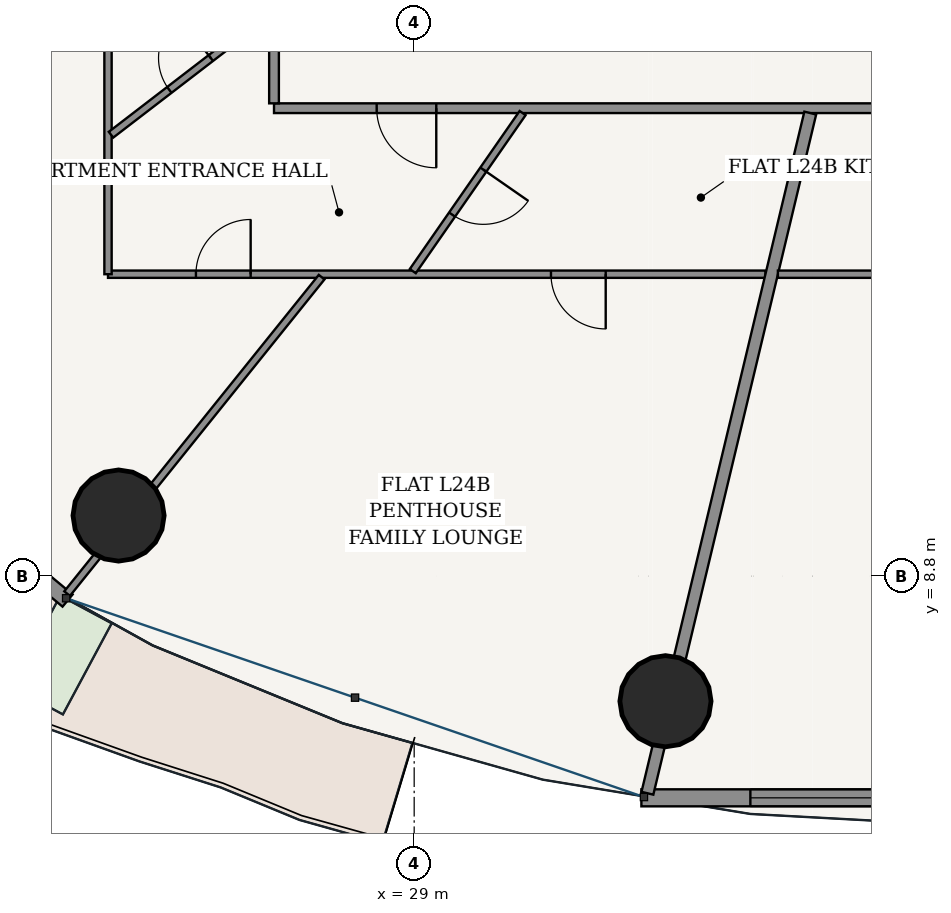
"""IFC4 building model, lengths in metres.
Left out: names, types, materials, properties, quantities, classifications, styles, units other than length and angle.
Written with IfcOpenShell. Run it as: python <this file> out.ifc"""

import sys

from ifc_helpers import new_model, si_unit, direction, frame, frame_2d, origin, origin_2d, place, context, subcontext, project, spatial, rectangle, hollow_circle, extrude, source, transform, mapped, element, fill, save


model = new_model("IFC4")
c1 = context("Model", 3, precision=1e-05, world=origin(), true_north=direction((-0.2419218956, 0.970295726276)))
c2 = subcontext(c1, "Body", "Model", "MODEL_VIEW")
j1 = project(units=[si_unit("LENGTHUNIT", "METRE"), si_unit("PLANEANGLEUNIT", "RADIAN")], contexts=[c1])
p1 = place(None, origin())
s1 = spatial("IfcSite", under=j1, at=p1, CompositionType="ELEMENT")
p2 = place(p1, origin())
s2 = spatial("IfcBuilding", under=s1, at=p2, CompositionType="ELEMENT")
p3 = place(p2, frame((0.0, 0.0, 94.2)))
s3 = spatial("IfcBuildingStorey", under=s2, at=p3, CompositionType="ELEMENT", Elevation=94.2)
for number, where, z_axis, x_axis in (
    (1, (24.138, 9.796, 0.0), (0.0, 0.0, 1.0), (1.0, 0.0, 0.0)),
    (2, (33.133, 6.743, 0.0), (0.0, 0.0, 1.0), (1.0, 0.0, 0.0)),
):
    element("IfcColumn", number, at=place(p3, frame(where, z_axis=z_axis, x_axis=x_axis)), inside=s3, PredefinedType="COLUMN", context=c2, shape_type="SweptSolid", body=[
        extrude(hollow_circle(Radius=0.75, WallThickness=0.045, at=origin_2d()), origin(), (0.0, 0.0, 1.0), 3.6),
    ])
p4 = place(p3, frame((15.846, 14.59, 0.0), z_axis=(0.0, 0.0, 1.0), x_axis=(0.769254958887, -0.638941944333, 0.0)))
e3 = element("IfcWall", 3, at=p4, inside=s3, PredefinedType="SOLIDWALL", context=c2, shape_type="SweptSolid", body=[
    extrude(rectangle(XDim=9.69, YDim=0.26, at=frame_2d((4.845, 0.0))), origin(), (0.0, 0.0, 1.0), 3.325),
])
p5 = place(p4, frame((4.17, 0.0, 0.0)))
e4 = element("IfcOpeningElement", 4, at=p5, cuts=e3, PredefinedType="OPENING", context=c2, shape_type="SweptSolid", body=[
    extrude(rectangle(XDim=1.35, YDim=2.2, at=frame_2d((0.675, 1.1))), frame((0.0, 0.14, 0.0), z_axis=(0.0, -1.0, 0.0), x_axis=(1.0, 0.0, 0.0)), (0.0, 0.0, 1.0), 0.28),
])
p6 = place(p3, frame((32.736, 5.154, 0.0), z_axis=(0.0, 0.0, 1.0), x_axis=(1.0, 0.0, 0.0)))
e5 = element("IfcWall", 5, at=p6, inside=s3, PredefinedType="SOLIDWALL", context=c2, shape_type="SweptSolid", body=[
    extrude(rectangle(XDim=10.527, YDim=0.28, at=frame_2d((5.264, 0.0))), origin(), (0.0, 0.0, 1.0), 3.325),
])
p7 = place(p6, frame((1.792, 0.0, 0.85)))
e6 = element("IfcOpeningElement", 6, at=p7, cuts=e5, PredefinedType="OPENING", context=c2, shape_type="SweptSolid", body=[
    extrude(rectangle(XDim=2.1, YDim=1.95, at=frame_2d((1.05, 0.975))), frame((0.0, 0.15, 0.0), z_axis=(0.0, -1.0, 0.0), x_axis=(1.0, 0.0, 0.0)), (0.0, 0.0, 1.0), 0.3),
])
p8 = place(p6, frame((6.635, 0.0, 0.85)))
e7 = element("IfcOpeningElement", 7, at=p8, cuts=e5, PredefinedType="OPENING", context=c2, shape_type="SweptSolid", body=[
    extrude(rectangle(XDim=2.1, YDim=1.95, at=frame_2d((1.05, 0.975))), frame((0.0, 0.15, 0.0), z_axis=(0.0, -1.0, 0.0), x_axis=(1.0, 0.0, 0.0)), (0.0, 0.0, 1.0), 0.3),
])
p9 = place(p3, frame((26.695, 16.495, 0.0), z_axis=(0.0, 0.0, 1.0), x_axis=(1.0, 0.0, 0.0)))
e8 = element("IfcWall", 8, at=p9, inside=s3, PredefinedType="PARTITIONING", context=c2, shape_type="SweptSolid", body=[
    extrude(rectangle(XDim=22.61, YDim=0.16, at=frame_2d((11.305, 0.0))), origin(), (0.0, 0.0, 1.0), 2.767),
])
p10 = place(p9, frame((1.688, 0.0, 0.0)))
e9 = element("IfcOpeningElement", 9, at=p10, cuts=e8, PredefinedType="OPENING", context=c2, shape_type="SweptSolid", body=[
    extrude(rectangle(XDim=0.98, YDim=2.2, at=frame_2d((0.49, 1.1))), frame((0.0, 0.09, 0.0), z_axis=(0.0, -1.0, 0.0), x_axis=(1.0, 0.0, 0.0)), (0.0, 0.0, 1.0), 0.18),
])
p11 = place(p9, frame((16.137, 0.0, 0.0)))
e10 = element("IfcOpeningElement", 10, at=p11, cuts=e8, PredefinedType="OPENING", context=c2, shape_type="SweptSolid", body=[
    extrude(rectangle(XDim=0.98, YDim=2.2, at=frame_2d((0.49, 1.1))), frame((0.0, 0.09, 0.0), z_axis=(0.0, -1.0, 0.0), x_axis=(1.0, 0.0, 0.0)), (0.0, 0.0, 1.0), 0.18),
])
p12 = place(p3, frame((26.695, 16.575, 0.0), z_axis=(0.0, 0.0, 1.0), x_axis=(0.0, 1.0, 0.0)))
e11 = element("IfcWall", 11, at=p12, inside=s3, PredefinedType="PARTITIONING", context=c2, shape_type="SweptSolid", body=[
    extrude(rectangle(XDim=20.45, YDim=0.16, at=frame_2d((10.225, 0.0))), origin(), (0.0, 0.0, 1.0), 2.767),
])
p13 = place(p3, frame((34.777, 13.765, 0.0), z_axis=(0.0, 0.0, 1.0), x_axis=(-1.0, 0.0, 0.0)))
e12 = element("IfcWall", 12, at=p13, inside=s3, PredefinedType="PARTITIONING", context=c2, shape_type="SweptSolid", body=[
    extrude(rectangle(XDim=10.812, YDim=0.12, at=frame_2d((5.406, 0.0))), origin(), (0.0, 0.0, 1.0), 2.767),
])
p14 = place(p13, frame((8.466, 0.0, 0.0)))
e13 = element("IfcOpeningElement", 13, at=p14, cuts=e12, PredefinedType="OPENING", context=c2, shape_type="SweptSolid", body=[
    extrude(rectangle(XDim=0.9, YDim=2.15, at=frame_2d((0.45, 1.075))), frame((0.0, 0.07, 0.0), z_axis=(0.0, -1.0, 0.0), x_axis=(1.0, 0.0, 0.0)), (0.0, 0.0, 1.0), 0.14),
])
p15 = place(p13, frame((2.628, 0.0, 0.0)))
e14 = element("IfcOpeningElement", 14, at=p15, cuts=e12, PredefinedType="OPENING", context=c2, shape_type="SweptSolid", body=[
    extrude(rectangle(XDim=0.9, YDim=2.15, at=frame_2d((0.45, 1.075))), frame((0.0, 0.07, 0.0), z_axis=(0.0, -1.0, 0.0), x_axis=(1.0, 0.0, 0.0)), (0.0, 0.0, 1.0), 0.14),
])
p16 = place(p3, frame((23.965, 13.765, 0.0), z_axis=(0.0, 0.0, 1.0), x_axis=(0.0, 1.0, 0.0)))
e15 = element("IfcWall", 15, at=p16, inside=s3, PredefinedType="PARTITIONING", context=c2, shape_type="SweptSolid", body=[
    extrude(rectangle(XDim=20.725, YDim=0.12, at=frame_2d((10.362, 0.0))), origin(), (0.0, 0.0, 1.0), 2.767),
])
p17 = place(p16, frame((9.401, 0.0, 0.0)))
e16 = element("IfcOpeningElement", 16, at=p17, cuts=e15, PredefinedType="OPENING", context=c2, shape_type="SweptSolid", body=[
    extrude(rectangle(XDim=0.9, YDim=2.15, at=frame_2d((0.45, 1.075))), frame((0.0, 0.07, 0.0), z_axis=(0.0, -1.0, 0.0), x_axis=(1.0, 0.0, 0.0)), (0.0, 0.0, 1.0), 0.14),
])
p18 = place(p16, frame((18.157, 0.0, 0.0)))
e17 = element("IfcOpeningElement", 17, at=p18, cuts=e15, PredefinedType="OPENING", context=c2, shape_type="SweptSolid", body=[
    extrude(rectangle(XDim=0.86, YDim=2.15, at=frame_2d((0.43, 1.075))), frame((0.0, 0.07, 0.0), z_axis=(0.0, -1.0, 0.0), x_axis=(1.0, 0.0, 0.0)), (0.0, 0.0, 1.0), 0.14),
])
p19 = place(p16, frame((14.376, 0.0, 0.0)))
e18 = element("IfcOpeningElement", 18, at=p19, cuts=e15, PredefinedType="OPENING", context=c2, shape_type="SweptSolid", body=[
    extrude(rectangle(XDim=0.9, YDim=2.15, at=frame_2d((0.45, 1.075))), frame((0.0, 0.07, 0.0), z_axis=(0.0, -1.0, 0.0), x_axis=(1.0, 0.0, 0.0)), (0.0, 0.0, 1.0), 0.14),
])
p20 = place(p3, frame((23.911, 18.979, 0.0), z_axis=(0.0, 0.0, 1.0), x_axis=(-0.874313476423, -0.485361664066, 0.0)))
e19 = element("IfcWall", 19, at=p20, inside=s3, PredefinedType="PARTITIONING", context=c2, shape_type="SweptSolid", body=[
    extrude(rectangle(XDim=9.066, YDim=0.12, at=frame_2d((4.533, 0.0))), origin(), (0.0, 0.0, 1.0), 2.767),
])
p21 = place(p20, frame((3.016, 0.0, 0.0)))
e20 = element("IfcOpeningElement", 20, at=p21, cuts=e19, PredefinedType="OPENING", context=c2, shape_type="SweptSolid", body=[
    extrude(rectangle(XDim=0.9, YDim=2.15, at=frame_2d((0.45, 1.075))), frame((0.0, 0.07, 0.0), z_axis=(0.0, -1.0, 0.0), x_axis=(1.0, 0.0, 0.0)), (0.0, 0.0, 1.0), 0.14),
])
p22 = place(p3, frame((27.478, 13.717, 0.0), z_axis=(0.0, 0.0, 1.0), x_axis=(-0.626707979732, -0.77925419995, 0.0)))
e21 = element("IfcWall", 21, at=p22, inside=s3, PredefinedType="PARTITIONING", context=c2, shape_type="SweptSolid", body=[
    extrude(rectangle(XDim=6.679, YDim=0.12, at=frame_2d((3.339, 0.0))), origin(), (0.0, 0.0, 1.0), 2.767),
])
p23 = place(p3, frame((26.615, 18.056, 0.0), z_axis=(0.0, 0.0, 1.0), x_axis=(-0.79311360735, -0.609073727751, 0.0)))
e22 = element("IfcWall", 22, at=p23, inside=s3, PredefinedType="PARTITIONING", context=c2, shape_type="SweptSolid", body=[
    extrude(rectangle(XDim=3.279, YDim=0.12, at=frame_2d((1.64, 0.0))), origin(), (0.0, 0.0, 1.0), 3.004),
])
p24 = place(p23, frame((1.21, 0.0, 0.0)))
e23 = element("IfcOpeningElement", 23, at=p24, cuts=e22, PredefinedType="OPENING", context=c2, shape_type="SweptSolid", body=[
    extrude(rectangle(XDim=0.86, YDim=2.15, at=frame_2d((0.43, 1.075))), frame((0.0, 0.07, 0.0), z_axis=(0.0, -1.0, 0.0), x_axis=(1.0, 0.0, 0.0)), (0.0, 0.0, 1.0), 0.14),
])
p25 = place(p3, frame((30.783, 16.415, 0.0), z_axis=(0.0, 0.0, 1.0), x_axis=(-0.570653089326, -0.821191239385, 0.0)))
e24 = element("IfcWall", 24, at=p25, inside=s3, PredefinedType="PARTITIONING", context=c2, shape_type="SweptSolid", body=[
    extrude(rectangle(XDim=3.165, YDim=0.12, at=frame_2d((1.583, 0.0))), origin(), (0.0, 0.0, 1.0), 3.004),
])
p26 = place(p25, frame((1.133, 0.0, 0.0)))
e25 = element("IfcOpeningElement", 25, at=p26, cuts=e24, PredefinedType="OPENING", context=c2, shape_type="SweptSolid", body=[
    extrude(rectangle(XDim=0.9, YDim=2.15, at=frame_2d((0.45, 1.075))), frame((0.0, 0.07, 0.0), z_axis=(0.0, -1.0, 0.0), x_axis=(1.0, 0.0, 0.0)), (0.0, 0.0, 1.0), 0.14),
])
p27 = place(p3, frame((35.514, 16.415, 0.0), z_axis=(0.0, 0.0, 1.0), x_axis=(-0.232829417917, -0.972517589636, 0.0)))
e26 = element("IfcWall", 26, at=p27, inside=s3, PredefinedType="PARTITIONING", context=c2, shape_type="SweptSolid", body=[
    extrude(rectangle(XDim=11.502, YDim=0.2, at=frame_2d((5.751, 0.0))), origin(), (0.0, 0.0, 1.0), 2.767),
])
p28 = place(p3, frame((52.035, 13.765, 0.0), z_axis=(0.0, 0.0, 1.0), x_axis=(-1.0, 0.0, 0.0)))
e27 = element("IfcWall", 27, at=p28, inside=s3, PredefinedType="PARTITIONING", context=c2, shape_type="SweptSolid", body=[
    extrude(rectangle(XDim=17.054, YDim=0.12, at=frame_2d((8.527, 0.0))), origin(), (0.0, 0.0, 1.0), 2.767),
])
p29 = place(p28, frame((7.203, 0.0, 0.0)))
e28 = element("IfcOpeningElement", 28, at=p29, cuts=e27, PredefinedType="OPENING", context=c2, shape_type="SweptSolid", body=[
    extrude(rectangle(XDim=0.9, YDim=2.15, at=frame_2d((0.45, 1.075))), frame((0.0, 0.07, 0.0), z_axis=(0.0, -1.0, 0.0), x_axis=(1.0, 0.0, 0.0)), (0.0, 0.0, 1.0), 0.14),
])
m1 = source(origin(), c2, "Body", "SweptSolid", [
    extrude(rectangle(XDim=2.1, YDim=1.95, at=frame_2d((1.05, 0.975))), frame((0.0, 0.03, 0.0), z_axis=(0.0, -1.0, 0.0), x_axis=(1.0, 0.0, 0.0)), (0.0, 0.0, 1.0), 0.06),
])
p30 = place(p7, origin())
e29 = element("IfcWindow", 29, at=p30, inside=s3, PartitioningType="SINGLE_PANEL", PredefinedType="WINDOW", context=c2, shape_type="MappedRepresentation", body=[
    mapped(m1, transform((0.0, 0.0, 0.0), scale=1.0)),
])
fill(e6, e29)
m2 = source(origin(), c2, "Body", "SweptSolid", [
    extrude(rectangle(XDim=0.98, YDim=2.2, at=frame_2d((0.49, 1.1))), frame((0.0, 0.025, 0.0), z_axis=(0.0, -1.0, 0.0), x_axis=(1.0, 0.0, 0.0)), (0.0, 0.0, 1.0), 0.05),
])
p31 = place(p10, frame((0.98, 0.0, 0.0), z_axis=(0.0, 0.0, 1.0), x_axis=(-1.0, 0.0, 0.0)))
e30 = element("IfcDoor", 30, at=p31, inside=s3, OperationType="SINGLE_SWING_LEFT", PredefinedType="DOOR", context=c2, shape_type="MappedRepresentation", body=[
    mapped(m2, transform((0.0, 0.0, 0.0), scale=1.0)),
])
fill(e9, e30)
m3 = source(origin(), c2, "Body", "SweptSolid", [
    extrude(rectangle(XDim=0.86, YDim=2.15, at=frame_2d((0.43, 1.075))), frame((0.0, 0.025, 0.0), z_axis=(0.0, -1.0, 0.0), x_axis=(1.0, 0.0, 0.0)), (0.0, 0.0, 1.0), 0.05),
])
p32 = place(p24, frame((0.86, 0.0, 0.0), z_axis=(0.0, 0.0, 1.0), x_axis=(-1.0, 0.0, 0.0)))
e31 = element("IfcDoor", 31, at=p32, inside=s3, OperationType="SINGLE_SWING_RIGHT", PredefinedType="DOOR", context=c2, shape_type="MappedRepresentation", body=[
    mapped(m3, transform((0.0, 0.0, 0.0), scale=1.0)),
])
fill(e23, e31)
m4 = source(origin(), c2, "Body", "SweptSolid", [
    extrude(rectangle(XDim=0.9, YDim=2.15, at=frame_2d((0.45, 1.075))), frame((0.0, 0.025, 0.0), z_axis=(0.0, -1.0, 0.0), x_axis=(1.0, 0.0, 0.0)), (0.0, 0.0, 1.0), 0.05),
])
p33 = place(p26, origin())
e32 = element("IfcDoor", 32, at=p33, inside=s3, OperationType="SINGLE_SWING_LEFT", PredefinedType="DOOR", context=c2, shape_type="MappedRepresentation", body=[
    mapped(m4, transform((0.0, 0.0, 0.0), scale=1.0)),
])
fill(e25, e32)
p34 = place(p14, frame((0.9, 0.0, 0.0), z_axis=(0.0, 0.0, 1.0), x_axis=(-1.0, 0.0, 0.0)))
e33 = element("IfcDoor", 33, at=p34, inside=s3, OperationType="SINGLE_SWING_RIGHT", PredefinedType="DOOR", context=c2, shape_type="MappedRepresentation", body=[
    mapped(m4, transform((0.0, 0.0, 0.0), scale=1.0)),
])
fill(e13, e33)
p35 = place(p15, origin())
e34 = element("IfcDoor", 34, at=p35, inside=s3, OperationType="SINGLE_SWING_LEFT", PredefinedType="DOOR", context=c2, shape_type="MappedRepresentation", body=[
    mapped(m4, transform((0.0, 0.0, 0.0), scale=1.0)),
])
fill(e14, e34)
save(model, sys.argv[1])
